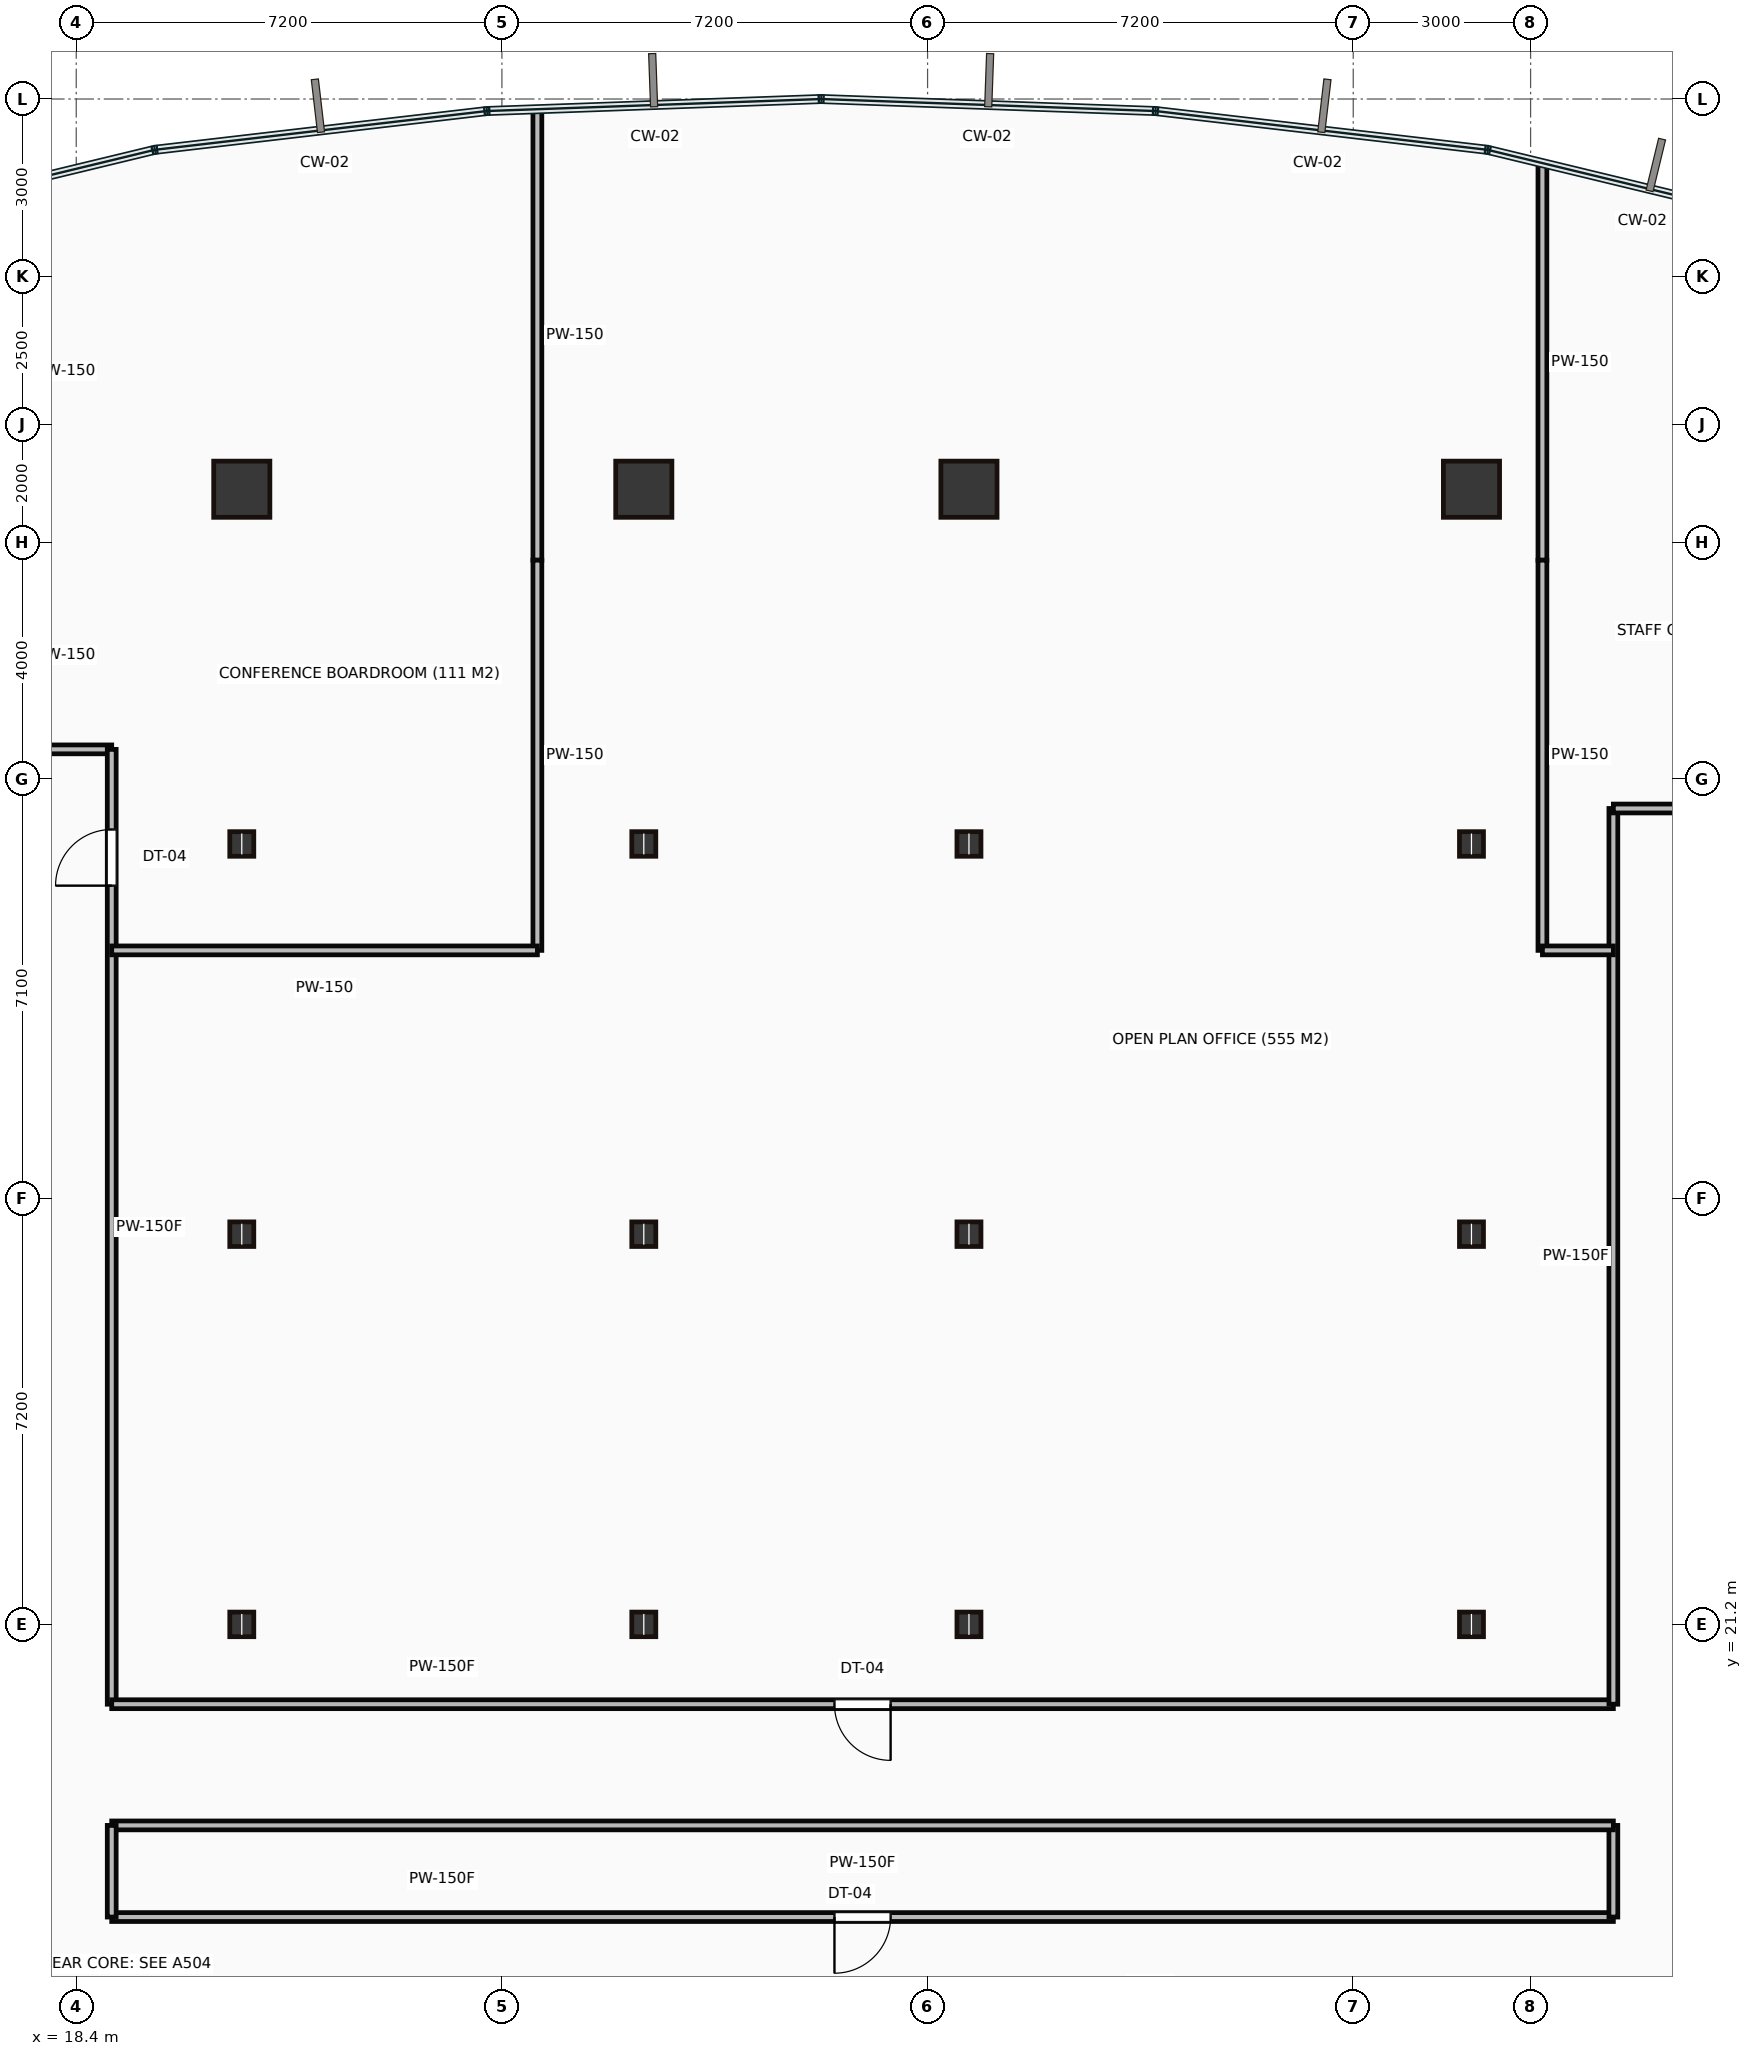
"""IFC4 building model, lengths in metres.
Left out: names, types, materials, properties, quantities, classifications, styles, units other than length and angle.
Written with IfcOpenShell. Run it as: python <this file> out.ifc"""

import sys

from ifc_helpers import new_model, si_unit, direction, frame, frame_2d, origin, origin_2d, place, context, subcontext, project, spatial, rectangle, hollow_rectangle, i_section, extrude, source, transform, mapped, element, fill, save


model = new_model("IFC4")
c1 = context("Model", 3, precision=1e-05, world=origin(), true_north=direction((0.0, 1.0)))
c2 = subcontext(c1, "Body", "Model", "MODEL_VIEW")
j1 = project(units=[si_unit("LENGTHUNIT", "METRE"), si_unit("PLANEANGLEUNIT", "RADIAN")], contexts=[c1])
p1 = place(None, origin())
s1 = spatial("IfcSite", under=j1, at=p1, CompositionType="ELEMENT")
p2 = place(p1, origin())
s2 = spatial("IfcBuilding", under=s1, at=p2, CompositionType="ELEMENT")
p3 = place(p2, frame((0.0, 0.0, 76.3)))
s3 = spatial("IfcBuildingStorey", under=s2, at=p3, CompositionType="ELEMENT", Elevation=76.3)
m1 = source(origin(), c2, "Body", "SweptSolid", [
    extrude(i_section(OverallWidth=0.406, OverallDepth=0.416, WebThickness=0.03, FlangeThickness=0.048, at=origin_2d()), origin(), (0.0, 0.0, 1.0), 3.65),
])
for number, where, z_axis, x_axis in (
    (1, (21.2, 21.2, 0.0), (0.0, 0.0, 1.0), (1.0, 0.0, 0.0)),
    (2, (21.2, 27.8, 0.0), (0.0, 0.0, 1.0), (1.0, 0.0, 0.0)),
    (3, (21.2, 34.4, 0.0), (0.0, 0.0, 1.0), (1.0, 0.0, 0.0)),
):
    element("IfcColumn", number, at=place(p3, frame(where, z_axis=z_axis, x_axis=x_axis)), inside=s3, PredefinedType="COLUMN", context=c2, shape_type="MappedRepresentation", body=[
        mapped(m1, transform((0.0, 0.0, 0.0))),
    ])
m2 = source(origin(), c2, "Body", "SweptSolid", [
    extrude(hollow_rectangle(XDim=0.95, YDim=0.95, WallThickness=0.045, at=origin_2d()), origin(), (0.0, 0.0, 1.0), 3.65),
])
p4 = place(p3, frame((21.2, 40.4, 0.0), z_axis=(0.0, 0.0, 1.0), x_axis=(1.0, 0.0, 0.0)))
e4 = element("IfcColumn", 4, at=p4, inside=s3, PredefinedType="COLUMN", context=c2, shape_type="MappedRepresentation", body=[
    mapped(m2, transform((0.0, 0.0, 0.0))),
])
for number, where, z_axis, x_axis in (
    (5, (28.0, 21.2, 0.0), (0.0, 0.0, 1.0), (1.0, 0.0, 0.0)),
    (6, (28.0, 27.8, 0.0), (0.0, 0.0, 1.0), (1.0, 0.0, 0.0)),
    (7, (28.0, 34.4, 0.0), (0.0, 0.0, 1.0), (1.0, 0.0, 0.0)),
):
    element("IfcColumn", number, at=place(p3, frame(where, z_axis=z_axis, x_axis=x_axis)), inside=s3, PredefinedType="COLUMN", context=c2, shape_type="MappedRepresentation", body=[
        mapped(m1, transform((0.0, 0.0, 0.0))),
    ])
p5 = place(p3, frame((28.0, 40.4, 0.0), z_axis=(0.0, 0.0, 1.0), x_axis=(1.0, 0.0, 0.0)))
e8 = element("IfcColumn", 8, at=p5, inside=s3, PredefinedType="COLUMN", context=c2, shape_type="MappedRepresentation", body=[
    mapped(m2, transform((0.0, 0.0, 0.0))),
])
for number, where, z_axis, x_axis in (
    (9, (33.5, 21.2, 0.0), (0.0, 0.0, 1.0), (1.0, 0.0, 0.0)),
    (10, (33.5, 27.8, 0.0), (0.0, 0.0, 1.0), (1.0, 0.0, 0.0)),
    (11, (33.5, 34.4, 0.0), (0.0, 0.0, 1.0), (1.0, 0.0, 0.0)),
):
    element("IfcColumn", number, at=place(p3, frame(where, z_axis=z_axis, x_axis=x_axis)), inside=s3, PredefinedType="COLUMN", context=c2, shape_type="MappedRepresentation", body=[
        mapped(m1, transform((0.0, 0.0, 0.0))),
    ])
p6 = place(p3, frame((33.5, 40.4, 0.0), z_axis=(0.0, 0.0, 1.0), x_axis=(1.0, 0.0, 0.0)))
e12 = element("IfcColumn", 12, at=p6, inside=s3, PredefinedType="COLUMN", context=c2, shape_type="MappedRepresentation", body=[
    mapped(m2, transform((0.0, 0.0, 0.0))),
])
for number, where, z_axis, x_axis in (
    (13, (42.0, 21.2, 0.0), (0.0, 0.0, 1.0), (1.0, 0.0, 0.0)),
    (14, (42.0, 27.8, 0.0), (0.0, 0.0, 1.0), (1.0, 0.0, 0.0)),
    (15, (42.0, 34.4, 0.0), (0.0, 0.0, 1.0), (1.0, 0.0, 0.0)),
):
    element("IfcColumn", number, at=place(p3, frame(where, z_axis=z_axis, x_axis=x_axis)), inside=s3, PredefinedType="COLUMN", context=c2, shape_type="MappedRepresentation", body=[
        mapped(m1, transform((0.0, 0.0, 0.0))),
    ])
p7 = place(p3, frame((42.0, 40.4, 0.0), z_axis=(0.0, 0.0, 1.0), x_axis=(1.0, 0.0, 0.0)))
e16 = element("IfcColumn", 16, at=p7, inside=s3, PredefinedType="COLUMN", context=c2, shape_type="MappedRepresentation", body=[
    mapped(m2, transform((0.0, 0.0, 0.0))),
])
m3 = source(origin(), c2, "Body", "SweptSolid", [
    extrude(rectangle(XDim=2.2, YDim=0.15, at=frame_2d((1.1, 0.0))), origin(), (0.0, 0.0, 1.0), 3.4),
])
p8 = place(p3, frame((16.8, 36.0, 0.0), z_axis=(0.0, 0.0, 1.0), x_axis=(1.0, 0.0, 0.0)))
e17 = element("IfcWall", 17, at=p8, inside=s3, PredefinedType="PARTITIONING", context=c2, shape_type="MappedRepresentation", body=[
    mapped(m3, transform((0.0, 0.0, 0.0))),
])
m4 = source(origin(), c2, "Body", "SweptSolid", [
    extrude(rectangle(XDim=16.15, YDim=0.15, at=frame_2d((8.075, 0.0))), origin(), (0.0, 0.0, 1.0), 3.4),
])
p9 = place(p3, frame((19.0, 36.0, 0.0), z_axis=(0.0, 0.0, 1.0), x_axis=(0.0, -1.0, 0.0)))
e18 = element("IfcWall", 18, at=p9, inside=s3, PredefinedType="PARTITIONING", context=c2, shape_type="MappedRepresentation", body=[
    mapped(m4, transform((0.0, 0.0, 0.0))),
])
p10 = place(p9, frame((1.355, 0.0, 0.0)))
e19 = element("IfcOpeningElement", 19, at=p10, cuts=e18, PredefinedType="OPENING", context=c2, shape_type="SweptSolid", body=[
    extrude(rectangle(XDim=0.95, YDim=2.15, at=frame_2d((0.475, 1.075))), frame((0.0, 0.085, 0.0), z_axis=(0.0, -1.0, 0.0), x_axis=(1.0, 0.0, 0.0)), (0.0, 0.0, 1.0), 0.17),
])
m5 = source(origin(), c2, "Body", "SweptSolid", [
    extrude(rectangle(XDim=25.4, YDim=0.15, at=frame_2d((12.7, 0.0))), origin(), (0.0, 0.0, 1.0), 3.4),
])
p11 = place(p3, frame((19.0, 19.85, 0.0), z_axis=(0.0, 0.0, 1.0), x_axis=(1.0, 0.0, 0.0)))
e20 = element("IfcWall", 20, at=p11, inside=s3, PredefinedType="PARTITIONING", context=c2, shape_type="MappedRepresentation", body=[
    mapped(m5, transform((0.0, 0.0, 0.0))),
])
p12 = place(p11, frame((12.225, 0.0, 0.0)))
e21 = element("IfcOpeningElement", 21, at=p12, cuts=e20, PredefinedType="OPENING", context=c2, shape_type="SweptSolid", body=[
    extrude(rectangle(XDim=0.95, YDim=2.15, at=frame_2d((0.475, 1.075))), frame((0.0, 0.085, 0.0), z_axis=(0.0, -1.0, 0.0), x_axis=(1.0, 0.0, 0.0)), (0.0, 0.0, 1.0), 0.17),
])
m6 = source(origin(), c2, "Body", "SweptSolid", [
    extrude(rectangle(XDim=15.15, YDim=0.15, at=frame_2d((7.575, 0.0))), origin(), (0.0, 0.0, 1.0), 3.4),
])
p13 = place(p3, frame((44.4, 19.85, 0.0), z_axis=(0.0, 0.0, 1.0), x_axis=(0.0, 1.0, 0.0)))
e22 = element("IfcWall", 22, at=p13, inside=s3, PredefinedType="PARTITIONING", context=c2, shape_type="MappedRepresentation", body=[
    mapped(m6, transform((0.0, 0.0, 0.0))),
])
m7 = source(origin(), c2, "Body", "SweptSolid", [
    extrude(rectangle(XDim=2.2, YDim=0.15, at=frame_2d((1.1, 0.0))), origin(), (0.0, 0.0, 1.0), 3.4),
])
p14 = place(p3, frame((44.4, 35.0, 0.0), z_axis=(0.0, 0.0, 1.0), x_axis=(1.0, 0.0, 0.0)))
e23 = element("IfcWall", 23, at=p14, inside=s3, PredefinedType="PARTITIONING", context=c2, shape_type="MappedRepresentation", body=[
    mapped(m7, transform((0.0, 0.0, 0.0))),
])
p15 = place(p3, frame((19.0, 16.25, 0.0), z_axis=(0.0, 0.0, 1.0), x_axis=(1.0, 0.0, 0.0)))
e24 = element("IfcWall", 24, at=p15, inside=s3, PredefinedType="PARTITIONING", context=c2, shape_type="MappedRepresentation", body=[
    mapped(m5, transform((0.0, 0.0, 0.0))),
])
p16 = place(p15, frame((12.225, 0.0, 0.0)))
e25 = element("IfcOpeningElement", 25, at=p16, cuts=e24, PredefinedType="OPENING", context=c2, shape_type="SweptSolid", body=[
    extrude(rectangle(XDim=0.95, YDim=2.15, at=frame_2d((0.475, 1.075))), frame((0.0, 0.085, 0.0), z_axis=(0.0, -1.0, 0.0), x_axis=(1.0, 0.0, 0.0)), (0.0, 0.0, 1.0), 0.17),
])
m8 = source(origin(), c2, "Body", "SweptSolid", [
    extrude(rectangle(XDim=1.55, YDim=0.15, at=frame_2d((0.775, 0.0))), origin(), (0.0, 0.0, 1.0), 3.4),
])
p17 = place(p3, frame((44.4, 16.25, 0.0), z_axis=(0.0, 0.0, 1.0), x_axis=(0.0, 1.0, 0.0)))
e26 = element("IfcWall", 26, at=p17, inside=s3, PredefinedType="PARTITIONING", context=c2, shape_type="MappedRepresentation", body=[
    mapped(m8, transform((0.0, 0.0, 0.0))),
])
p18 = place(p3, frame((44.4, 17.8, 0.0), z_axis=(0.0, 0.0, 1.0), x_axis=(-1.0, 0.0, 0.0)))
e27 = element("IfcWall", 27, at=p18, inside=s3, PredefinedType="PARTITIONING", context=c2, shape_type="MappedRepresentation", body=[
    mapped(m5, transform((0.0, 0.0, 0.0))),
])
p19 = place(p3, frame((19.0, 17.8, 0.0), z_axis=(0.0, 0.0, 1.0), x_axis=(0.0, -1.0, 0.0)))
e28 = element("IfcWall", 28, at=p19, inside=s3, PredefinedType="PARTITIONING", context=c2, shape_type="MappedRepresentation", body=[
    mapped(m8, transform((0.0, 0.0, 0.0))),
])
m9 = source(origin(), c2, "Body", "SweptSolid", [
    extrude(rectangle(XDim=7.608, YDim=0.15, at=frame_2d((3.804, 0.0))), origin(), (0.0, 0.0, 1.0), 3.4),
])
p20 = place(p3, frame((26.2, 46.808, 0.0), z_axis=(0.0, 0.0, 1.0), x_axis=(0.0, -1.0, 0.0)))
e29 = element("IfcWall", 29, at=p20, inside=s3, PredefinedType="PARTITIONING", context=c2, shape_type="MappedRepresentation", body=[
    mapped(m9, transform((0.0, 0.0, 0.0))),
])
m10 = source(origin(), c2, "Body", "SweptSolid", [
    extrude(rectangle(XDim=6.6, YDim=0.15, at=frame_2d((3.3, 0.0))), origin(), (0.0, 0.0, 1.0), 3.4),
])
p21 = place(p3, frame((26.2, 39.2, 0.0), z_axis=(0.0, 0.0, 1.0), x_axis=(0.0, -1.0, 0.0)))
e30 = element("IfcWall", 30, at=p21, inside=s3, PredefinedType="PARTITIONING", context=c2, shape_type="MappedRepresentation", body=[
    mapped(m10, transform((0.0, 0.0, 0.0))),
])
m11 = source(origin(), c2, "Body", "SweptSolid", [
    extrude(rectangle(XDim=7.2, YDim=0.15, at=frame_2d((3.6, 0.0))), origin(), (0.0, 0.0, 1.0), 3.4),
])
p22 = place(p3, frame((26.2, 32.6, 0.0), z_axis=(0.0, 0.0, 1.0), x_axis=(-1.0, 0.0, 0.0)))
e31 = element("IfcWall", 31, at=p22, inside=s3, PredefinedType="PARTITIONING", context=c2, shape_type="MappedRepresentation", body=[
    mapped(m11, transform((0.0, 0.0, 0.0))),
])
m12 = source(origin(), c2, "Body", "SweptSolid", [
    extrude(rectangle(XDim=6.696, YDim=0.15, at=frame_2d((3.348, 0.0))), origin(), (0.0, 0.0, 1.0), 3.4),
])
p23 = place(p3, frame((43.2, 45.896, 0.0), z_axis=(0.0, 0.0, 1.0), x_axis=(0.0, -1.0, 0.0)))
e32 = element("IfcWall", 32, at=p23, inside=s3, PredefinedType="PARTITIONING", context=c2, shape_type="MappedRepresentation", body=[
    mapped(m12, transform((0.0, 0.0, 0.0))),
])
p24 = place(p3, frame((43.2, 39.2, 0.0), z_axis=(0.0, 0.0, 1.0), x_axis=(0.0, -1.0, 0.0)))
e33 = element("IfcWall", 33, at=p24, inside=s3, PredefinedType="PARTITIONING", context=c2, shape_type="MappedRepresentation", body=[
    mapped(m10, transform((0.0, 0.0, 0.0))),
])
m13 = source(origin(), c2, "Body", "SweptSolid", [
    extrude(rectangle(XDim=1.2, YDim=0.15, at=frame_2d((0.6, 0.0))), origin(), (0.0, 0.0, 1.0), 3.4),
])
p25 = place(p3, frame((43.2, 32.6, 0.0), z_axis=(0.0, 0.0, 1.0), x_axis=(1.0, 0.0, 0.0)))
e34 = element("IfcWall", 34, at=p25, inside=s3, PredefinedType="PARTITIONING", context=c2, shape_type="MappedRepresentation", body=[
    mapped(m13, transform((0.0, 0.0, 0.0))),
])
m14 = source(origin(), c2, "Body", "SweptSolid", [
    extrude(rectangle(XDim=0.95, YDim=2.15, at=frame_2d((0.475, 1.075))), frame((0.0, 0.025, 0.0), z_axis=(0.0, -1.0, 0.0), x_axis=(1.0, 0.0, 0.0)), (0.0, 0.0, 1.0), 0.05),
])
p26 = place(p10, origin())
e35 = element("IfcDoor", 35, at=p26, inside=s3, OperationType="SINGLE_SWING_RIGHT", PredefinedType="DOOR", context=c2, shape_type="MappedRepresentation", body=[
    mapped(m14, transform((0.0, 0.0, 0.0))),
])
fill(e19, e35)
p27 = place(p16, origin())
e36 = element("IfcDoor", 36, at=p27, inside=s3, OperationType="SINGLE_SWING_LEFT", PredefinedType="DOOR", context=c2, shape_type="MappedRepresentation", body=[
    mapped(m14, transform((0.0, 0.0, 0.0))),
])
fill(e25, e36)
p28 = place(p12, origin())
e37 = element("IfcDoor", 37, at=p28, inside=s3, OperationType="SINGLE_SWING_RIGHT", PredefinedType="DOOR", context=c2, shape_type="MappedRepresentation", body=[
    mapped(m14, transform((0.0, 0.0, 0.0))),
])
fill(e21, e37)
save(model, sys.argv[1])
